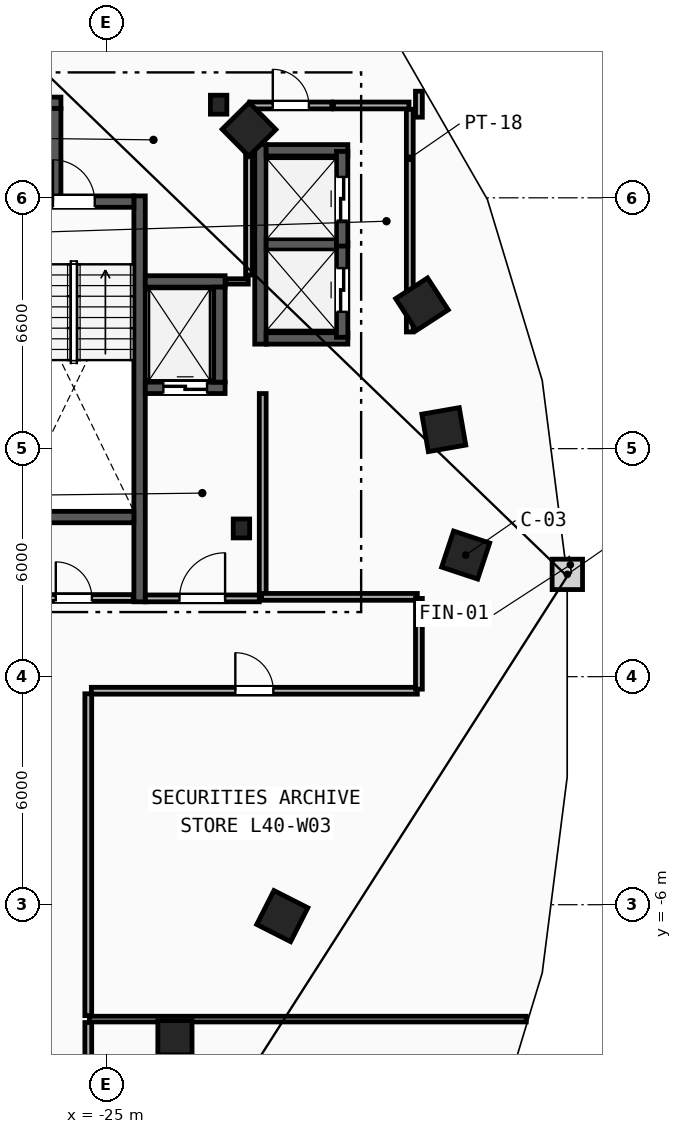
"""IFC4 building model, lengths in metres.
Left out: names, types, materials, properties, quantities, classifications, styles, units other than length and angle.
Written with IfcOpenShell. Run it as: python <this file> out.ifc"""

import sys

from ifc_helpers import new_model, si_unit, direction, frame, frame_2d, origin, origin_2d, place, context, subcontext, project, spatial, rectangle, i_section, extrude, element, fill, save


model = new_model("IFC4")
c1 = context("Model", 3, precision=1e-05, world=origin(), true_north=direction((0.0, 1.0)))
c2 = subcontext(c1, "Body", "Model", "MODEL_VIEW")
j1 = project(units=[si_unit("LENGTHUNIT", "METRE"), si_unit("PLANEANGLEUNIT", "RADIAN")], contexts=[c1])
p1 = place(None, origin())
s1 = spatial("IfcSite", under=j1, at=p1, CompositionType="ELEMENT")
p2 = place(p1, origin())
s2 = spatial("IfcBuilding", under=s1, at=p2, CompositionType="ELEMENT")
p3 = place(p2, frame((0.0, 0.0, 154.8)))
s3 = spatial("IfcBuildingStorey", under=s2, at=p3, CompositionType="ELEMENT", Elevation=154.8)
for number, where, z_axis, x_axis in (
    (1, (-21.45, 3.9, 0.0), (0.0, 0.0, 1.0), (1.0, 0.0, 0.0)),
    (2, (-22.05, 15.05, 0.0), (0.0, 0.0, 1.0), (1.0, 0.0, 0.0)),
):
    element("IfcColumn", number, at=place(p3, frame(where, z_axis=z_axis, x_axis=x_axis)), inside=s3, PredefinedType="COLUMN", context=c2, shape_type="SweptSolid", body=[
        extrude(i_section(OverallWidth=0.432, OverallDepth=0.498, WebThickness=0.056, FlangeThickness=0.089, FilletRadius=0.018, at=origin_2d()), origin(), (0.0, 0.0, 1.0), 3.6),
    ])
p4 = place(p3, frame((-23.2, -9.5, 0.0), z_axis=(0.0, 0.0, 1.0), x_axis=(1.0, 0.0, 0.0)))
e3 = element("IfcColumn", 3, at=p4, inside=s3, PredefinedType="COLUMN", context=c2, shape_type="SweptSolid", body=[
    extrude(rectangle(XDim=0.9, YDim=0.9, at=origin_2d()), origin(), (0.0, 0.0, 1.0), 3.6),
])
for number, where, z_axis, x_axis in (
    (4, (-15.55, 3.2, 0.0), (0.0, 0.0, 1.0), (0.315, 0.949, 0.0)),
    (5, (-16.125, 6.5, 0.0), (0.0, 0.0, 1.0), (-0.172, 0.985, 0.0)),
    (6, (-16.7, 9.8, 0.0), (0.0, 0.0, 1.0), (-0.544, 0.839, 0.0)),
    (7, (-21.25, 14.4, 0.0), (0.0, 0.0, 1.0), (-0.703, 0.711, 0.0)),
    (8, (-20.375, -6.3, 0.0), (0.0, 0.0, 1.0), (0.453, 0.892, 0.0)),
):
    element("IfcColumn", number, at=place(p3, frame(where, z_axis=z_axis, x_axis=x_axis)), inside=s3, PredefinedType="COLUMN", context=c2, shape_type="SweptSolid", body=[
        extrude(rectangle(XDim=1.0, YDim=1.0, at=origin_2d()), origin(), (0.0, 0.0, 1.0), 3.6),
    ])
p5 = place(p3, frame((-24.13, 1.97, 0.0), z_axis=(0.0, 0.0, 1.0), x_axis=(0.0, 1.0, 0.0)))
e9 = element("IfcWall", 9, at=p5, inside=s3, PredefinedType="SHEAR", context=c2, shape_type="SweptSolid", body=[
    extrude(rectangle(XDim=10.68, YDim=0.3, at=frame_2d((5.34, 0.0))), origin(), (0.0, 0.0, 1.0), 3.36),
])
p6 = place(p3, frame((-27.44, 12.5, 0.0), z_axis=(0.0, 0.0, 1.0), x_axis=(1.0, 0.0, 0.0)))
e10 = element("IfcWall", 10, at=p6, inside=s3, PredefinedType="SHEAR", context=c2, shape_type="SweptSolid", body=[
    extrude(rectangle(XDim=3.16, YDim=0.3, at=frame_2d((1.58, 0.0))), origin(), (0.0, 0.0, 1.0), 3.36),
])
p7 = place(p6, frame((1.03, 0.0, 0.0)))
e11 = element("IfcOpeningElement", 11, at=p7, cuts=e10, PredefinedType="OPENING", context=c2, shape_type="SweptSolid", body=[
    extrude(rectangle(XDim=1.1, YDim=2.15, at=frame_2d((0.55, 1.075))), frame((0.0, 0.16, 0.0), z_axis=(0.0, -1.0, 0.0), x_axis=(1.0, 0.0, 0.0)), (0.0, 0.0, 1.0), 0.32),
])
p8 = place(p3, frame((-27.44, 4.2, 0.0), z_axis=(0.0, 0.0, 1.0), x_axis=(1.0, 0.0, 0.0)))
e12 = element("IfcWall", 12, at=p8, inside=s3, PredefinedType="SHEAR", context=c2, shape_type="SweptSolid", body=[
    extrude(rectangle(XDim=3.16, YDim=0.3, at=frame_2d((1.58, 0.0))), origin(), (0.0, 0.0, 1.0), 3.36),
])
p9 = place(p3, frame((-20.89, 2.15, 0.0), z_axis=(0.0, 0.0, 1.0), x_axis=(0.0, 1.0, 0.0)))
e13 = element("IfcWall", 13, at=p9, inside=s3, PredefinedType="PARTITIONING", context=c2, shape_type="SweptSolid", body=[
    extrude(rectangle(XDim=5.3, YDim=0.18, at=frame_2d((2.65, 0.0))), origin(), (0.0, 0.0, 1.0), 3.36),
])
p10 = place(p3, frame((-23.98, 2.06, 0.0), z_axis=(0.0, 0.0, 1.0), x_axis=(1.0, 0.0, 0.0)))
e14 = element("IfcWall", 14, at=p10, inside=s3, PredefinedType="PARTITIONING", context=c2, shape_type="SweptSolid", body=[
    extrude(rectangle(XDim=3.0, YDim=0.18, at=frame_2d((1.5, 0.0))), origin(), (0.0, 0.0, 1.0), 3.36),
])
p11 = place(p10, frame((0.9, 0.0, 0.0)))
e15 = element("IfcOpeningElement", 15, at=p11, cuts=e14, PredefinedType="OPENING", context=c2, shape_type="SweptSolid", body=[
    extrude(rectangle(XDim=1.2, YDim=2.15, at=frame_2d((0.6, 1.075))), frame((0.0, 0.1, 0.0), z_axis=(0.0, -1.0, 0.0), x_axis=(1.0, 0.0, 0.0)), (0.0, 0.0, 1.0), 0.2),
])
p12 = place(p3, frame((-23.98, 7.6, 0.0), z_axis=(0.0, 0.0, 1.0), x_axis=(1.0, 0.0, 0.0)))
e16 = element("IfcWall", 16, at=p12, inside=s3, PredefinedType="SHEAR", context=c2, shape_type="SweptSolid", body=[
    extrude(rectangle(XDim=2.1, YDim=0.3, at=frame_2d((1.05, 0.0))), origin(), (0.0, 0.0, 1.0), 3.36),
])
p13 = place(p12, frame((0.475, 0.0, 0.0)))
e17 = element("IfcOpeningElement", 17, at=p13, cuts=e16, PredefinedType="OPENING", context=c2, shape_type="SweptSolid", body=[
    extrude(rectangle(XDim=1.15, YDim=2.2, at=frame_2d((0.575, 1.1))), frame((0.0, 0.16, 0.0), z_axis=(0.0, -1.0, 0.0), x_axis=(1.0, 0.0, 0.0)), (0.0, 0.0, 1.0), 0.32),
])
p14 = place(p3, frame((-23.98, 10.4, 0.0), z_axis=(0.0, 0.0, 1.0), x_axis=(1.0, 0.0, 0.0)))
e18 = element("IfcWall", 18, at=p14, inside=s3, PredefinedType="SHEAR", context=c2, shape_type="SweptSolid", body=[
    extrude(rectangle(XDim=2.1, YDim=0.3, at=frame_2d((1.05, 0.0))), origin(), (0.0, 0.0, 1.0), 3.36),
])
for number, where, z_axis, x_axis in (
    (19, (-22.03, 7.75, 0.0), (0.0, 0.0, 1.0), (0.0, 1.0, 0.0)),
    (20, (-28.7, 15.1, 0.0), (0.0, 0.0, 1.0), (1.0, 0.0, 0.0)),
):
    element("IfcWall", number, at=place(p3, frame(where, z_axis=z_axis, x_axis=x_axis)), inside=s3, PredefinedType="SHEAR", context=c2, shape_type="SweptSolid", body=[
        extrude(rectangle(XDim=2.5, YDim=0.3, at=frame_2d((1.25, 0.0))), origin(), (0.0, 0.0, 1.0), 3.36),
    ])
p15 = place(p3, frame((-26.35, 12.65, 0.0), z_axis=(0.0, 0.0, 1.0), x_axis=(0.0, 1.0, 0.0)))
e21 = element("IfcWall", 21, at=p15, inside=s3, PredefinedType="SHEAR", context=c2, shape_type="SweptSolid", body=[
    extrude(rectangle(XDim=2.3, YDim=0.3, at=frame_2d((1.15, 0.0))), origin(), (0.0, 0.0, 1.0), 3.36),
])
p16 = place(p3, frame((-20.95, 8.75, 0.0), z_axis=(0.0, 0.0, 1.0), x_axis=(0.0, 1.0, 0.0)))
e22 = element("IfcWall", 22, at=p16, inside=s3, PredefinedType="SHEAR", context=c2, shape_type="SweptSolid", body=[
    extrude(rectangle(XDim=5.25, YDim=0.3, at=frame_2d((2.625, 0.0))), origin(), (0.0, 0.0, 1.0), 3.36),
])
for number, where, z_axis, x_axis in (
    (23, (-20.8, 8.9, 0.0), (0.0, 0.0, 1.0), (1.0, 0.0, 0.0)),
    (24, (-20.8, 13.85, 0.0), (0.0, 0.0, 1.0), (1.0, 0.0, 0.0)),
):
    element("IfcWall", number, at=place(p3, frame(where, z_axis=z_axis, x_axis=x_axis)), inside=s3, PredefinedType="SHEAR", context=c2, shape_type="SweptSolid", body=[
        extrude(rectangle(XDim=2.15, YDim=0.3, at=frame_2d((1.075, 0.0))), origin(), (0.0, 0.0, 1.0), 3.36),
    ])
p17 = place(p3, frame((-20.8, 11.375, 0.0), z_axis=(0.0, 0.0, 1.0), x_axis=(1.0, 0.0, 0.0)))
e25 = element("IfcWall", 25, at=p17, inside=s3, PredefinedType="SHEAR", context=c2, shape_type="SweptSolid", body=[
    extrude(rectangle(XDim=1.85, YDim=0.3, at=frame_2d((0.925, 0.0))), origin(), (0.0, 0.0, 1.0), 3.36),
])
p18 = place(p3, frame((-18.8, 8.93, 0.0), z_axis=(0.0, 0.0, 1.0), x_axis=(0.0, 1.0, 0.0)))
e26 = element("IfcWall", 26, at=p18, inside=s3, PredefinedType="SHEAR", context=c2, shape_type="SweptSolid", body=[
    extrude(rectangle(XDim=2.49, YDim=0.3, at=frame_2d((1.245, 0.0))), origin(), (0.0, 0.0, 1.0), 3.36),
])
p19 = place(p18, frame((0.67, 0.0, 0.0)))
e27 = element("IfcOpeningElement", 27, at=p19, cuts=e26, PredefinedType="OPENING", context=c2, shape_type="SweptSolid", body=[
    extrude(rectangle(XDim=1.15, YDim=2.2, at=frame_2d((0.575, 1.1))), frame((0.0, 0.16, 0.0), z_axis=(0.0, -1.0, 0.0), x_axis=(1.0, 0.0, 0.0)), (0.0, 0.0, 1.0), 0.32),
])
p20 = place(p3, frame((-18.8, 11.33, 0.0), z_axis=(0.0, 0.0, 1.0), x_axis=(0.0, 1.0, 0.0)))
e28 = element("IfcWall", 28, at=p20, inside=s3, PredefinedType="SHEAR", context=c2, shape_type="SweptSolid", body=[
    extrude(rectangle(XDim=2.49, YDim=0.3, at=frame_2d((1.245, 0.0))), origin(), (0.0, 0.0, 1.0), 3.36),
])
p21 = place(p20, frame((0.67, 0.0, 0.0)))
e29 = element("IfcOpeningElement", 29, at=p21, cuts=e28, PredefinedType="OPENING", context=c2, shape_type="SweptSolid", body=[
    extrude(rectangle(XDim=1.15, YDim=2.2, at=frame_2d((0.575, 1.1))), frame((0.0, 0.16, 0.0), z_axis=(0.0, -1.0, 0.0), x_axis=(1.0, 0.0, 0.0)), (0.0, 0.0, 1.0), 0.32),
])
p22 = place(p3, frame((-17.02, 9.07, 0.0), z_axis=(0.0, 0.0, 1.0), x_axis=(0.0, 1.0, 0.0)))
e30 = element("IfcWall", 30, at=p22, inside=s3, PredefinedType="PARTITIONING", context=c2, shape_type="SweptSolid", body=[
    extrude(rectangle(XDim=5.86, YDim=0.18, at=frame_2d((2.93, 0.0))), origin(), (0.0, 0.0, 1.0), 3.36),
])
p23 = place(p3, frame((-21.23, 15.03, 0.0), z_axis=(0.0, 0.0, 1.0), x_axis=(1.0, 0.0, 0.0)))
e31 = element("IfcWall", 31, at=p23, inside=s3, PredefinedType="PARTITIONING", context=c2, shape_type="SweptSolid", body=[
    extrude(rectangle(XDim=2.16, YDim=0.18, at=frame_2d((1.08, 0.0))), origin(), (0.0, 0.0, 1.0), 3.36),
])
p24 = place(p23, frame((0.605, 0.0, 0.0)))
e32 = element("IfcOpeningElement", 32, at=p24, cuts=e31, PredefinedType="OPENING", context=c2, shape_type="SweptSolid", body=[
    extrude(rectangle(XDim=0.95, YDim=2.1, at=frame_2d((0.475, 1.05))), frame((0.0, 0.1, 0.0), z_axis=(0.0, -1.0, 0.0), x_axis=(1.0, 0.0, 0.0)), (0.0, 0.0, 1.0), 0.2),
])
p25 = place(p3, frame((-19.03, 15.03, 0.0), z_axis=(0.0, 0.0, 1.0), x_axis=(1.0, 0.0, 0.0)))
e33 = element("IfcWall", 33, at=p25, inside=s3, PredefinedType="PARTITIONING", context=c2, shape_type="SweptSolid", body=[
    extrude(rectangle(XDim=1.99, YDim=0.18, at=frame_2d((0.995, 0.0))), origin(), (0.0, 0.0, 1.0), 3.36),
])
p26 = place(p3, frame((-21.86, 10.4, 0.0), z_axis=(0.0, 0.0, 1.0), x_axis=(1.0, 0.0, 0.0)))
e34 = element("IfcWall", 34, at=p26, inside=s3, PredefinedType="PARTITIONING", context=c2, shape_type="SweptSolid", body=[
    extrude(rectangle(XDim=0.59, YDim=0.14, at=frame_2d((0.295, 0.0))), origin(), (0.0, 0.0, 1.0), 3.36),
])
p27 = place(p3, frame((-21.25, 10.57, 0.0), z_axis=(0.0, 0.0, 1.0), x_axis=(0.0, 1.0, 0.0)))
e35 = element("IfcWall", 35, at=p27, inside=s3, PredefinedType="PARTITIONING", context=c2, shape_type="SweptSolid", body=[
    extrude(rectangle(XDim=4.36, YDim=0.18, at=frame_2d((2.18, 0.0))), origin(), (0.0, 0.0, 1.0), 3.36),
])
p28 = place(p3, frame((-27.42, 2.07, 0.0), z_axis=(0.0, 0.0, 1.0), x_axis=(1.0, 0.0, 0.0)))
e36 = element("IfcWall", 36, at=p28, inside=s3, PredefinedType="PARTITIONING", context=c2, shape_type="SweptSolid", body=[
    extrude(rectangle(XDim=3.12, YDim=0.18, at=frame_2d((1.56, 0.0))), origin(), (0.0, 0.0, 1.0), 3.36),
])
p29 = place(p28, frame((1.085, 0.0, 0.0)))
e37 = element("IfcOpeningElement", 37, at=p29, cuts=e36, PredefinedType="OPENING", context=c2, shape_type="SweptSolid", body=[
    extrude(rectangle(XDim=0.95, YDim=2.1, at=frame_2d((0.475, 1.05))), frame((0.0, 0.1, 0.0), z_axis=(0.0, -1.0, 0.0), x_axis=(1.0, 0.0, 0.0)), (0.0, 0.0, 1.0), 0.2),
])
p30 = place(p3, frame((-25.45, -9.01, 0.0), z_axis=(0.0, 0.0, 1.0), x_axis=(1.0, 0.0, 0.0)))
e38 = element("IfcWall", 38, at=p30, inside=s3, PredefinedType="PARTITIONING", context=c2, shape_type="SweptSolid", body=[
    extrude(rectangle(XDim=11.495, YDim=0.15, at=frame_2d((5.748, 0.0))), origin(), (0.0, 0.0, 1.0), 3.36),
])
p31 = place(p3, frame((-25.48, -11.178, 0.0), z_axis=(0.0, 0.0, 1.0), x_axis=(0.0, 1.0, 0.0)))
e39 = element("IfcWall", 39, at=p31, inside=s3, PredefinedType="PARTITIONING", context=c2, shape_type="SweptSolid", body=[
    extrude(rectangle(XDim=2.078, YDim=0.18, at=frame_2d((1.039, 0.0))), origin(), (0.0, 0.0, 1.0), 3.36),
])
p32 = place(p3, frame((-25.4, -0.37, 0.0), z_axis=(0.0, 0.0, 1.0), x_axis=(1.0, 0.0, 0.0)))
e40 = element("IfcWall", 40, at=p32, inside=s3, PredefinedType="PARTITIONING", context=c2, shape_type="SweptSolid", body=[
    extrude(rectangle(XDim=8.578, YDim=0.18, at=frame_2d((4.289, 0.0))), origin(), (0.0, 0.0, 1.0), 3.36),
])
p33 = place(p32, frame((3.789, 0.0, 0.0)))
e41 = element("IfcOpeningElement", 41, at=p33, cuts=e40, PredefinedType="OPENING", context=c2, shape_type="SweptSolid", body=[
    extrude(rectangle(XDim=1.0, YDim=2.15, at=frame_2d((0.5, 1.075))), frame((0.0, 0.1, 0.0), z_axis=(0.0, -1.0, 0.0), x_axis=(1.0, 0.0, 0.0)), (0.0, 0.0, 1.0), 0.2),
])
p34 = place(p3, frame((-25.48, -8.92, 0.0), z_axis=(0.0, 0.0, 1.0), x_axis=(0.0, 1.0, 0.0)))
e42 = element("IfcWall", 42, at=p34, inside=s3, PredefinedType="PARTITIONING", context=c2, shape_type="SweptSolid", body=[
    extrude(rectangle(XDim=8.47, YDim=0.18, at=frame_2d((4.235, 0.0))), origin(), (0.0, 0.0, 1.0), 3.36),
])
p35 = place(p3, frame((-16.822, 2.1, 0.0), z_axis=(0.0, 0.0, 1.0), x_axis=(-1.0, 0.0, 0.0)))
e43 = element("IfcWall", 43, at=p35, inside=s3, PredefinedType="PARTITIONING", context=c2, shape_type="SweptSolid", body=[
    extrude(rectangle(XDim=4.098, YDim=0.18, at=frame_2d((2.049, 0.0))), origin(), (0.0, 0.0, 1.0), 3.36),
])
p36 = place(p3, frame((-16.78, -0.329, 0.0), z_axis=(0.0, 0.0, 1.0), x_axis=(0.0, 1.0, 0.0)))
e44 = element("IfcWall", 44, at=p36, inside=s3, PredefinedType="PARTITIONING", context=c2, shape_type="SweptSolid", body=[
    extrude(rectangle(XDim=2.387, YDim=0.18, at=frame_2d((1.194, 0.0))), origin(), (0.0, 0.0, 1.0), 3.36),
])
p37 = place(p3, frame((-16.78, 14.721, 0.0), z_axis=(0.0, 0.0, 1.0), x_axis=(0.0, 1.0, 0.0)))
e45 = element("IfcWall", 45, at=p37, inside=s3, PredefinedType="PARTITIONING", context=c2, shape_type="SweptSolid", body=[
    extrude(rectangle(XDim=0.684, YDim=0.18, at=frame_2d((0.342, 0.0))), origin(), (0.0, 0.0, 1.0), 3.36),
])
p38 = place(p7, origin())
e46 = element("IfcDoor", 46, at=p38, inside=s3, OperationType="SINGLE_SWING_LEFT", PredefinedType="DOOR", context=c2, shape_type="SweptSolid", body=[
    extrude(rectangle(XDim=1.1, YDim=2.15, at=frame_2d((0.55, 1.075))), frame((0.0, 0.025, 0.0), z_axis=(0.0, -1.0, 0.0), x_axis=(1.0, 0.0, 0.0)), (0.0, 0.0, 1.0), 0.05),
])
fill(e11, e46)
p39 = place(p11, origin())
e47 = element("IfcDoor", 47, at=p39, inside=s3, OperationType="SINGLE_SWING_RIGHT", PredefinedType="DOOR", context=c2, shape_type="SweptSolid", body=[
    extrude(rectangle(XDim=1.2, YDim=2.15, at=frame_2d((0.6, 1.075))), frame((0.0, 0.025, 0.0), z_axis=(0.0, -1.0, 0.0), x_axis=(1.0, 0.0, 0.0)), (0.0, 0.0, 1.0), 0.05),
])
fill(e15, e47)
p40 = place(p13, origin())
e48 = element("IfcDoor", 48, at=p40, inside=s3, OperationType="SLIDING_TO_LEFT", PredefinedType="TRAPDOOR", context=c2, shape_type="SweptSolid", body=[
    extrude(rectangle(XDim=1.15, YDim=2.2, at=frame_2d((0.575, 1.1))), frame((0.0, 0.025, 0.0), z_axis=(0.0, -1.0, 0.0), x_axis=(1.0, 0.0, 0.0)), (0.0, 0.0, 1.0), 0.05),
])
fill(e17, e48)
p41 = place(p19, origin())
e49 = element("IfcDoor", 49, at=p41, inside=s3, OperationType="SLIDING_TO_LEFT", PredefinedType="TRAPDOOR", context=c2, shape_type="SweptSolid", body=[
    extrude(rectangle(XDim=1.15, YDim=2.2, at=frame_2d((0.575, 1.1))), frame((0.0, 0.025, 0.0), z_axis=(0.0, -1.0, 0.0), x_axis=(1.0, 0.0, 0.0)), (0.0, 0.0, 1.0), 0.05),
])
fill(e27, e49)
p42 = place(p21, origin())
e50 = element("IfcDoor", 50, at=p42, inside=s3, OperationType="SLIDING_TO_LEFT", PredefinedType="TRAPDOOR", context=c2, shape_type="SweptSolid", body=[
    extrude(rectangle(XDim=1.15, YDim=2.2, at=frame_2d((0.575, 1.1))), frame((0.0, 0.025, 0.0), z_axis=(0.0, -1.0, 0.0), x_axis=(1.0, 0.0, 0.0)), (0.0, 0.0, 1.0), 0.05),
])
fill(e29, e50)
p43 = place(p33, origin())
e51 = element("IfcDoor", 51, at=p43, inside=s3, OperationType="SINGLE_SWING_LEFT", PredefinedType="DOOR", context=c2, shape_type="SweptSolid", body=[
    extrude(rectangle(XDim=1.0, YDim=2.15, at=frame_2d((0.5, 1.075))), frame((0.0, 0.025, 0.0), z_axis=(0.0, -1.0, 0.0), x_axis=(1.0, 0.0, 0.0)), (0.0, 0.0, 1.0), 0.05),
])
fill(e41, e51)
p44 = place(p29, origin())
e52 = element("IfcDoor", 52, at=p44, inside=s3, OperationType="SINGLE_SWING_LEFT", PredefinedType="DOOR", context=c2, shape_type="SweptSolid", body=[
    extrude(rectangle(XDim=0.95, YDim=2.1, at=frame_2d((0.475, 1.05))), frame((0.0, 0.025, 0.0), z_axis=(0.0, -1.0, 0.0), x_axis=(1.0, 0.0, 0.0)), (0.0, 0.0, 1.0), 0.05),
])
fill(e37, e52)
p45 = place(p24, origin())
e53 = element("IfcDoor", 53, at=p45, inside=s3, OperationType="SINGLE_SWING_LEFT", PredefinedType="DOOR", context=c2, shape_type="SweptSolid", body=[
    extrude(rectangle(XDim=0.95, YDim=2.1, at=frame_2d((0.475, 1.05))), frame((0.0, 0.025, 0.0), z_axis=(0.0, -1.0, 0.0), x_axis=(1.0, 0.0, 0.0)), (0.0, 0.0, 1.0), 0.05),
])
fill(e32, e53)
save(model, sys.argv[1])
